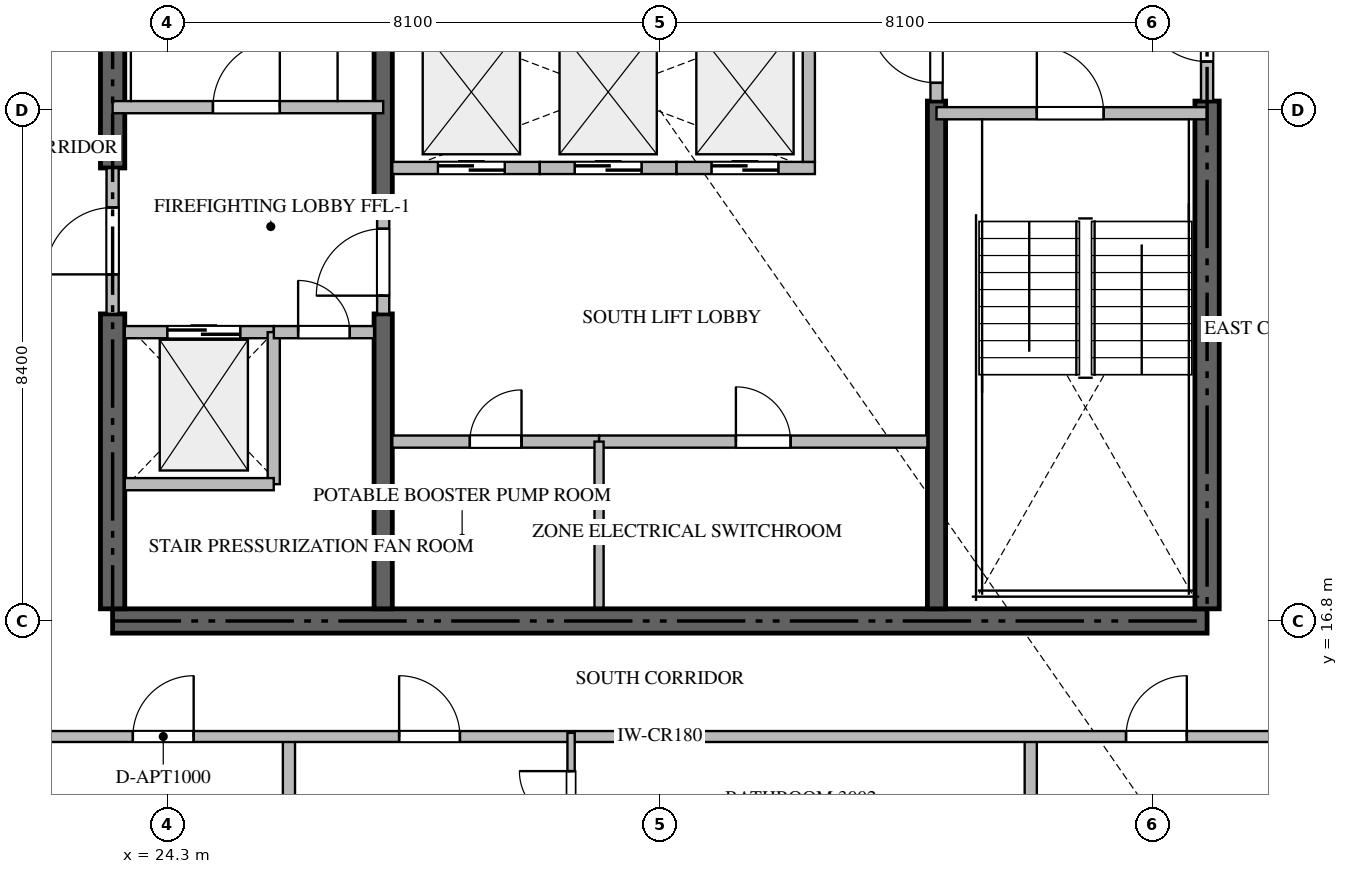
"""IFC4 building model, lengths in metres.
Left out: names, types, materials, properties, quantities, classifications, styles, units other than length and angle.
Written with IfcOpenShell. Run it as: python <this file> out.ifc"""

import sys

from ifc_helpers import new_model, si_unit, direction, frame, frame_2d, origin, place, context, subcontext, project, spatial, rectangle, extrude, source, transform, mapped, element, fill, save


model = new_model("IFC4")
c1 = context("Model", 3, precision=1e-05, world=origin(), true_north=direction((0.0, 1.0)))
c2 = subcontext(c1, "Body", "Model", "MODEL_VIEW")
j1 = project(units=[si_unit("LENGTHUNIT", "METRE"), si_unit("PLANEANGLEUNIT", "RADIAN")], contexts=[c1])
p1 = place(None, origin())
s1 = spatial("IfcSite", under=j1, at=p1, CompositionType="ELEMENT")
p2 = place(p1, origin())
s2 = spatial("IfcBuilding", under=s1, at=p2, CompositionType="ELEMENT")
p3 = place(p2, frame((0.0, 0.0, 123.9)))
s3 = spatial("IfcBuildingStorey", under=s2, at=p3, CompositionType="ELEMENT", Elevation=123.9)
p4 = place(p3, frame((23.4, 16.8, -0.26), z_axis=(0.0, 0.0, 1.0), x_axis=(1.0, 0.0, 0.0)))
e1 = element("IfcWall", 1, at=p4, inside=s3, PredefinedType="SHEAR", context=c2, shape_type="SweptSolid", body=[
    extrude(rectangle(XDim=18.0, YDim=0.4, at=frame_2d((9.0, 0.0))), origin(), (0.0, 0.0, 1.0), 3.748),
])
p5 = place(p3, frame((23.4, 17.0, -0.26), z_axis=(0.0, 0.0, 1.0), x_axis=(0.0, 1.0, 0.0)))
e2 = element("IfcWall", 2, at=p5, inside=s3, PredefinedType="SHEAR", context=c2, shape_type="SweptSolid", body=[
    extrude(rectangle(XDim=4.85, YDim=0.4, at=frame_2d((2.425, 0.0))), origin(), (0.0, 0.0, 1.0), 3.748),
])
p6 = place(p3, frame((23.4, 24.25, -0.26), z_axis=(0.0, 0.0, 1.0), x_axis=(0.0, 1.0, 0.0)))
e3 = element("IfcWall", 3, at=p6, inside=s3, PredefinedType="SHEAR", context=c2, shape_type="SweptSolid", body=[
    extrude(rectangle(XDim=9.15, YDim=0.4, at=frame_2d((4.575, 0.0))), origin(), (0.0, 0.0, 1.0), 3.748),
])
p7 = place(p3, frame((41.4, 17.0, -0.26), z_axis=(0.0, 0.0, 1.0), x_axis=(0.0, 1.0, 0.0)))
e4 = element("IfcWall", 4, at=p7, inside=s3, PredefinedType="SHEAR", context=c2, shape_type="SweptSolid", body=[
    extrude(rectangle(XDim=8.35, YDim=0.4, at=frame_2d((4.175, 0.0))), origin(), (0.0, 0.0, 1.0), 3.748),
])
p8 = place(p3, frame((27.85, 17.0, -0.26), z_axis=(0.0, 0.0, 1.0), x_axis=(0.0, 1.0, 0.0)))
e5 = element("IfcWall", 5, at=p8, inside=s3, PredefinedType="SHEAR", context=c2, shape_type="SweptSolid", body=[
    extrude(rectangle(XDim=4.85, YDim=0.3, at=frame_2d((2.425, 0.0))), origin(), (0.0, 0.0, 1.0), 3.748),
])
p9 = place(p3, frame((27.85, 23.55, -0.26), z_axis=(0.0, 0.0, 1.0), x_axis=(0.0, 1.0, 0.0)))
e6 = element("IfcWall", 6, at=p9, inside=s3, PredefinedType="SHEAR", context=c2, shape_type="SweptSolid", body=[
    extrude(rectangle(XDim=9.85, YDim=0.3, at=frame_2d((4.925, 0.0))), origin(), (0.0, 0.0, 1.0), 3.748),
])
p10 = place(p3, frame((36.95, 17.0, -0.26), z_axis=(0.0, 0.0, 1.0), x_axis=(0.0, 1.0, 0.0)))
e7 = element("IfcWall", 7, at=p10, inside=s3, PredefinedType="SHEAR", context=c2, shape_type="SweptSolid", body=[
    extrude(rectangle(XDim=8.35, YDim=0.3, at=frame_2d((4.175, 0.0))), origin(), (0.0, 0.0, 1.0), 3.748),
])
p11 = place(p3, frame((23.4, 25.25, 0.0), z_axis=(0.0, 0.0, 1.0), x_axis=(1.0, 0.0, 0.0)))
e8 = element("IfcWall", 8, at=p11, inside=s3, PredefinedType="STANDARD", context=c2, shape_type="SweptSolid", body=[
    extrude(rectangle(XDim=4.45, YDim=0.2, at=frame_2d((2.225, 0.0))), origin(), (0.0, 0.0, 1.0), 3.49),
])
p12 = place(p11, frame((1.65, 0.0, 0.0)))
e9 = element("IfcOpeningElement", 9, at=p12, cuts=e8, PredefinedType="OPENING", context=c2, shape_type="SweptSolid", body=[
    extrude(rectangle(XDim=1.1, YDim=2.15, at=frame_2d((0.55, 1.075))), frame((0.0, 0.11, 0.0), z_axis=(0.0, -1.0, 0.0), x_axis=(1.0, 0.0, 0.0)), (0.0, 0.0, 1.0), 0.22),
])
p13 = place(p3, frame((36.95, 25.15, 0.0), z_axis=(0.0, 0.0, 1.0), x_axis=(1.0, 0.0, 0.0)))
e10 = element("IfcWall", 10, at=p13, inside=s3, PredefinedType="STANDARD", context=c2, shape_type="SweptSolid", body=[
    extrude(rectangle(XDim=4.45, YDim=0.2, at=frame_2d((2.225, 0.0))), origin(), (0.0, 0.0, 1.0), 3.49),
])
p14 = place(p13, frame((1.65, 0.0, 0.0)))
e11 = element("IfcOpeningElement", 11, at=p14, cuts=e10, PredefinedType="OPENING", context=c2, shape_type="SweptSolid", body=[
    extrude(rectangle(XDim=1.1, YDim=2.15, at=frame_2d((0.55, 1.075))), frame((0.0, 0.11, 0.0), z_axis=(0.0, -1.0, 0.0), x_axis=(1.0, 0.0, 0.0)), (0.0, 0.0, 1.0), 0.22),
])
p15 = place(p3, frame((23.6, 21.55, 0.0), z_axis=(0.0, 0.0, 1.0), x_axis=(1.0, 0.0, 0.0)))
e12 = element("IfcWall", 12, at=p15, inside=s3, PredefinedType="STANDARD", context=c2, shape_type="SweptSolid", body=[
    extrude(rectangle(XDim=2.45, YDim=0.2, at=frame_2d((1.225, 0.0))), origin(), (0.0, 0.0, 1.0), 3.49),
])
p16 = place(p15, frame((0.7, 0.0, 0.0)))
e13 = element("IfcOpeningElement", 13, at=p16, cuts=e12, PredefinedType="OPENING", context=c2, shape_type="SweptSolid", body=[
    extrude(rectangle(XDim=1.2, YDim=2.2, at=frame_2d((0.6, 1.1))), frame((0.0, 0.11, 0.0), z_axis=(0.0, -1.0, 0.0), x_axis=(1.0, 0.0, 0.0)), (0.0, 0.0, 1.0), 0.22),
])
p17 = place(p3, frame((28.0, 24.25, 0.0), z_axis=(0.0, 0.0, 1.0), x_axis=(1.0, 0.0, 0.0)))
e14 = element("IfcWall", 14, at=p17, inside=s3, PredefinedType="STANDARD", context=c2, shape_type="SweptSolid", body=[
    extrude(rectangle(XDim=2.425, YDim=0.2, at=frame_2d((1.212, 0.0))), origin(), (0.0, 0.0, 1.0), 3.49),
])
p18 = place(p17, frame((0.75, 0.0, 0.0)))
e15 = element("IfcOpeningElement", 15, at=p18, cuts=e14, PredefinedType="OPENING", context=c2, shape_type="SweptSolid", body=[
    extrude(rectangle(XDim=1.1, YDim=2.2, at=frame_2d((0.55, 1.1))), frame((0.0, 0.11, 0.0), z_axis=(0.0, -1.0, 0.0), x_axis=(1.0, 0.0, 0.0)), (0.0, 0.0, 1.0), 0.22),
])
p19 = place(p3, frame((30.425, 24.25, 0.0), z_axis=(0.0, 0.0, 1.0), x_axis=(1.0, 0.0, 0.0)))
e16 = element("IfcWall", 16, at=p19, inside=s3, PredefinedType="STANDARD", context=c2, shape_type="SweptSolid", body=[
    extrude(rectangle(XDim=2.25, YDim=0.2, at=frame_2d((1.125, 0.0))), origin(), (0.0, 0.0, 1.0), 3.49),
])
p20 = place(p19, frame((0.575, 0.0, 0.0)))
e17 = element("IfcOpeningElement", 17, at=p20, cuts=e16, PredefinedType="OPENING", context=c2, shape_type="SweptSolid", body=[
    extrude(rectangle(XDim=1.1, YDim=2.2, at=frame_2d((0.55, 1.1))), frame((0.0, 0.11, 0.0), z_axis=(0.0, -1.0, 0.0), x_axis=(1.0, 0.0, 0.0)), (0.0, 0.0, 1.0), 0.22),
])
p21 = place(p3, frame((32.675, 24.25, 0.0), z_axis=(0.0, 0.0, 1.0), x_axis=(1.0, 0.0, 0.0)))
e18 = element("IfcWall", 18, at=p21, inside=s3, PredefinedType="STANDARD", context=c2, shape_type="SweptSolid", body=[
    extrude(rectangle(XDim=2.275, YDim=0.2, at=frame_2d((1.137, 0.0))), origin(), (0.0, 0.0, 1.0), 3.49),
])
p22 = place(p21, frame((0.575, 0.0, 0.0)))
e19 = element("IfcOpeningElement", 19, at=p22, cuts=e18, PredefinedType="OPENING", context=c2, shape_type="SweptSolid", body=[
    extrude(rectangle(XDim=1.1, YDim=2.2, at=frame_2d((0.55, 1.1))), frame((0.0, 0.11, 0.0), z_axis=(0.0, -1.0, 0.0), x_axis=(1.0, 0.0, 0.0)), (0.0, 0.0, 1.0), 0.22),
])
for number, where, z_axis, x_axis in (
    (20, (34.85, 24.35, 0.0), (0.0, 0.0, 1.0), (0.0, 1.0, 0.0)),
    (21, (26.05, 19.05, 0.0), (0.0, 0.0, 1.0), (0.0, 1.0, 0.0)),
):
    element("IfcWall", number, at=place(p3, frame(where, z_axis=z_axis, x_axis=x_axis)), inside=s3, PredefinedType="STANDARD", context=c2, shape_type="SweptSolid", body=[
        extrude(rectangle(XDim=2.5, YDim=0.2, at=frame_2d((1.25, 0.0))), origin(), (0.0, 0.0, 1.0), 3.49),
    ])
p23 = place(p3, frame((23.6, 19.05, 0.0), z_axis=(0.0, 0.0, 1.0), x_axis=(1.0, 0.0, 0.0)))
e22 = element("IfcWall", 22, at=p23, inside=s3, PredefinedType="STANDARD", context=c2, shape_type="SweptSolid", body=[
    extrude(rectangle(XDim=2.45, YDim=0.2, at=frame_2d((1.225, 0.0))), origin(), (0.0, 0.0, 1.0), 3.49),
])
p24 = place(p3, frame((26.052, 21.55, 0.0), z_axis=(0.0, 0.0, 1.0), x_axis=(1.0, 0.0, 0.0)))
e23 = element("IfcWall", 23, at=p24, inside=s3, PredefinedType="STANDARD", context=c2, shape_type="SweptSolid", body=[
    extrude(rectangle(XDim=1.648, YDim=0.2, at=frame_2d((0.824, 0.0))), origin(), (0.0, 0.0, 1.0), 3.49),
])
p25 = place(p24, frame((0.399, 0.0, 0.0)))
e24 = element("IfcOpeningElement", 24, at=p25, cuts=e23, PredefinedType="OPENING", context=c2, shape_type="SweptSolid", body=[
    extrude(rectangle(XDim=0.85, YDim=2.1, at=frame_2d((0.425, 1.05))), frame((0.0, 0.11, 0.0), z_axis=(0.0, -1.0, 0.0), x_axis=(1.0, 0.0, 0.0)), (0.0, 0.0, 1.0), 0.22),
])
p26 = place(p3, frame((23.4, 21.852, 0.0), z_axis=(0.0, 0.0, 1.0), x_axis=(0.0, 1.0, 0.0)))
e25 = element("IfcWall", 25, at=p26, inside=s3, PredefinedType="STANDARD", context=c2, shape_type="SweptSolid", body=[
    extrude(rectangle(XDim=2.396, YDim=0.2, at=frame_2d((1.198, 0.0))), origin(), (0.0, 0.0, 1.0), 3.49),
])
p27 = place(p26, frame((0.648, 0.0, 0.0)))
e26 = element("IfcOpeningElement", 26, at=p27, cuts=e25, PredefinedType="OPENING", context=c2, shape_type="SweptSolid", body=[
    extrude(rectangle(XDim=1.1, YDim=2.15, at=frame_2d((0.55, 1.075))), frame((0.0, 0.11, 0.0), z_axis=(0.0, -1.0, 0.0), x_axis=(1.0, 0.0, 0.0)), (0.0, 0.0, 1.0), 0.22),
])
p28 = place(p3, frame((41.4, 25.352, 0.0), z_axis=(0.0, 0.0, 1.0), x_axis=(0.0, 1.0, 0.0)))
e27 = element("IfcWall", 27, at=p28, inside=s3, PredefinedType="STANDARD", context=c2, shape_type="SweptSolid", body=[
    extrude(rectangle(XDim=2.396, YDim=0.2, at=frame_2d((1.198, 0.0))), origin(), (0.0, 0.0, 1.0), 3.49),
])
p29 = place(p28, frame((0.648, 0.0, 0.0)))
e28 = element("IfcOpeningElement", 28, at=p29, cuts=e27, PredefinedType="OPENING", context=c2, shape_type="SweptSolid", body=[
    extrude(rectangle(XDim=1.1, YDim=2.15, at=frame_2d((0.55, 1.075))), frame((0.0, 0.11, 0.0), z_axis=(0.0, -1.0, 0.0), x_axis=(1.0, 0.0, 0.0)), (0.0, 0.0, 1.0), 0.22),
])
p30 = place(p3, frame((27.85, 21.852, 0.0), z_axis=(0.0, 0.0, 1.0), x_axis=(0.0, 1.0, 0.0)))
e29 = element("IfcWall", 29, at=p30, inside=s3, PredefinedType="STANDARD", context=c2, shape_type="SweptSolid", body=[
    extrude(rectangle(XDim=1.696, YDim=0.2, at=frame_2d((0.848, 0.0))), origin(), (0.0, 0.0, 1.0), 3.49),
])
p31 = place(p30, frame((0.298, 0.0, 0.0)))
e30 = element("IfcOpeningElement", 30, at=p31, cuts=e29, PredefinedType="OPENING", context=c2, shape_type="SweptSolid", body=[
    extrude(rectangle(XDim=1.1, YDim=2.15, at=frame_2d((0.55, 1.075))), frame((0.0, 0.11, 0.0), z_axis=(0.0, -1.0, 0.0), x_axis=(1.0, 0.0, 0.0)), (0.0, 0.0, 1.0), 0.22),
])
p32 = place(p3, frame((36.95, 25.352, 0.0), z_axis=(0.0, 0.0, 1.0), x_axis=(0.0, 1.0, 0.0)))
e31 = element("IfcWall", 31, at=p32, inside=s3, PredefinedType="STANDARD", context=c2, shape_type="SweptSolid", body=[
    extrude(rectangle(XDim=1.696, YDim=0.2, at=frame_2d((0.848, 0.0))), origin(), (0.0, 0.0, 1.0), 3.49),
])
p33 = place(p32, frame((0.298, 0.0, 0.0)))
e32 = element("IfcOpeningElement", 32, at=p33, cuts=e31, PredefinedType="OPENING", context=c2, shape_type="SweptSolid", body=[
    extrude(rectangle(XDim=1.1, YDim=2.15, at=frame_2d((0.55, 1.075))), frame((0.0, 0.11, 0.0), z_axis=(0.0, -1.0, 0.0), x_axis=(1.0, 0.0, 0.0)), (0.0, 0.0, 1.0), 0.22),
])
p34 = place(p3, frame((28.0, 19.75, 0.0), z_axis=(0.0, 0.0, 1.0), x_axis=(1.0, 0.0, 0.0)))
e33 = element("IfcWall", 33, at=p34, inside=s3, PredefinedType="STANDARD", context=c2, shape_type="SweptSolid", body=[
    extrude(rectangle(XDim=3.4, YDim=0.2, at=frame_2d((1.7, 0.0))), origin(), (0.0, 0.0, 1.0), 3.49),
])
p35 = place(p34, frame((1.275, 0.0, 0.0)))
e34 = element("IfcOpeningElement", 34, at=p35, cuts=e33, PredefinedType="OPENING", context=c2, shape_type="SweptSolid", body=[
    extrude(rectangle(XDim=0.85, YDim=2.1, at=frame_2d((0.425, 1.05))), frame((0.0, 0.11, 0.0), z_axis=(0.0, -1.0, 0.0), x_axis=(1.0, 0.0, 0.0)), (0.0, 0.0, 1.0), 0.22),
])
p36 = place(p3, frame((31.402, 19.75, 0.0), z_axis=(0.0, 0.0, 1.0), x_axis=(1.0, 0.0, 0.0)))
e35 = element("IfcWall", 35, at=p36, inside=s3, PredefinedType="STANDARD", context=c2, shape_type="SweptSolid", body=[
    extrude(rectangle(XDim=5.398, YDim=0.2, at=frame_2d((2.699, 0.0))), origin(), (0.0, 0.0, 1.0), 3.49),
])
p37 = place(p36, frame((2.249, 0.0, 0.0)))
e36 = element("IfcOpeningElement", 36, at=p37, cuts=e35, PredefinedType="OPENING", context=c2, shape_type="SweptSolid", body=[
    extrude(rectangle(XDim=0.9, YDim=2.1, at=frame_2d((0.45, 1.05))), frame((0.0, 0.11, 0.0), z_axis=(0.0, -1.0, 0.0), x_axis=(1.0, 0.0, 0.0)), (0.0, 0.0, 1.0), 0.22),
])
p38 = place(p3, frame((31.4, 17.02, 0.0), z_axis=(0.0, 0.0, 1.0), x_axis=(0.0, 1.0, 0.0)))
e37 = element("IfcWall", 37, at=p38, inside=s3, PredefinedType="PARTITIONING", context=c2, shape_type="SweptSolid", body=[
    extrude(rectangle(XDim=2.73, YDim=0.15, at=frame_2d((1.365, 0.0))), origin(), (0.0, 0.0, 1.0), 3.49),
])
for number, where, z_axis, x_axis in (
    (38, (26.3, 1.482, 0.0), (0.0, 0.0, 1.0), (0.0, 1.0, 0.0)),
    (39, (38.5, 1.482, 0.0), (0.0, 0.0, 1.0), (0.0, 1.0, 0.0)),
):
    element("IfcWall", number, at=place(p3, frame(where, z_axis=z_axis, x_axis=x_axis)), inside=s3, PredefinedType="PARTITIONING", context=c2, shape_type="SweptSolid", body=[
        extrude(rectangle(XDim=13.418, YDim=0.2, at=frame_2d((6.709, 0.0))), origin(), (0.0, 0.0, 1.0), 3.49),
    ])
p39 = place(p3, frame((20.952, 14.9, 0.0), z_axis=(0.0, 0.0, 1.0), x_axis=(1.0, 0.0, 0.0)))
e40 = element("IfcWall", 40, at=p39, inside=s3, PredefinedType="PARTITIONING", context=c2, shape_type="SweptSolid", body=[
    extrude(rectangle(XDim=22.896, YDim=0.18, at=frame_2d((11.448, 0.0))), origin(), (0.0, 0.0, 1.0), 3.49),
])
p40 = place(p39, frame((2.781, 0.0, 0.0)))
e41 = element("IfcOpeningElement", 41, at=p40, cuts=e40, PredefinedType="OPENING", context=c2, shape_type="SweptSolid", body=[
    extrude(rectangle(XDim=1.0, YDim=2.15, at=frame_2d((0.5, 1.075))), frame((0.0, 0.1, 0.0), z_axis=(0.0, -1.0, 0.0), x_axis=(1.0, 0.0, 0.0)), (0.0, 0.0, 1.0), 0.2),
])
p41 = place(p39, frame((7.16, 0.0, 0.0)))
e42 = element("IfcOpeningElement", 42, at=p41, cuts=e40, PredefinedType="OPENING", context=c2, shape_type="SweptSolid", body=[
    extrude(rectangle(XDim=1.0, YDim=2.15, at=frame_2d((0.5, 1.075))), frame((0.0, 0.1, 0.0), z_axis=(0.0, -1.0, 0.0), x_axis=(1.0, 0.0, 0.0)), (0.0, 0.0, 1.0), 0.2),
])
p42 = place(p39, frame((19.115, 0.0, 0.0)))
e43 = element("IfcOpeningElement", 43, at=p42, cuts=e40, PredefinedType="OPENING", context=c2, shape_type="SweptSolid", body=[
    extrude(rectangle(XDim=1.0, YDim=2.15, at=frame_2d((0.5, 1.075))), frame((0.0, 0.1, 0.0), z_axis=(0.0, -1.0, 0.0), x_axis=(1.0, 0.0, 0.0)), (0.0, 0.0, 1.0), 0.2),
])
p43 = place(p3, frame((30.94, 12.852, 0.0), z_axis=(0.0, 0.0, 1.0), x_axis=(0.0, 1.0, 0.0)))
e44 = element("IfcWall", 44, at=p43, inside=s3, PredefinedType="PARTITIONING", context=c2, shape_type="SweptSolid", body=[
    extrude(rectangle(XDim=2.108, YDim=0.12, at=frame_2d((1.054, 0.0))), origin(), (0.0, 0.0, 1.0), 3.49),
])
p44 = place(p43, frame((0.629, 0.0, 0.0)))
e45 = element("IfcOpeningElement", 45, at=p44, cuts=e44, PredefinedType="OPENING", context=c2, shape_type="SweptSolid", body=[
    extrude(rectangle(XDim=0.85, YDim=2.1, at=frame_2d((0.425, 1.05))), frame((0.0, 0.07, 0.0), z_axis=(0.0, -1.0, 0.0), x_axis=(1.0, 0.0, 0.0)), (0.0, 0.0, 1.0), 0.14),
])
m1 = source(origin(), c2, "Body", "SweptSolid", [
    extrude(rectangle(XDim=1.1, YDim=2.15, at=frame_2d((0.55, 1.075))), frame((0.0, 0.025, 0.0), z_axis=(0.0, -1.0, 0.0), x_axis=(1.0, 0.0, 0.0)), (0.0, 0.0, 1.0), 0.05),
])
p45 = place(p12, origin())
e46 = element("IfcDoor", 46, at=p45, inside=s3, OperationType="SINGLE_SWING_RIGHT", PredefinedType="DOOR", context=c2, shape_type="MappedRepresentation", body=[
    mapped(m1, transform((0.0, 0.0, 0.0), scale=1.0)),
])
fill(e9, e46)
p46 = place(p14, origin())
e47 = element("IfcDoor", 47, at=p46, inside=s3, OperationType="SINGLE_SWING_LEFT", PredefinedType="DOOR", context=c2, shape_type="MappedRepresentation", body=[
    mapped(m1, transform((0.0, 0.0, 0.0), scale=1.0)),
])
fill(e11, e47)
m2 = source(origin(), c2, "Body", "SweptSolid", [
    extrude(rectangle(XDim=1.2, YDim=2.2, at=frame_2d((0.6, 1.1))), frame((0.0, 0.025, 0.0), z_axis=(0.0, -1.0, 0.0), x_axis=(1.0, 0.0, 0.0)), (0.0, 0.0, 1.0), 0.05),
])
p47 = place(p16, origin())
e48 = element("IfcDoor", 48, at=p47, inside=s3, OperationType="DOUBLE_DOOR_SLIDING", PredefinedType="DOOR", context=c2, shape_type="MappedRepresentation", body=[
    mapped(m2, transform((0.0, 0.0, 0.0), scale=1.0)),
])
fill(e13, e48)
m3 = source(origin(), c2, "Body", "SweptSolid", [
    extrude(rectangle(XDim=1.1, YDim=2.2, at=frame_2d((0.55, 1.1))), frame((0.0, 0.025, 0.0), z_axis=(0.0, -1.0, 0.0), x_axis=(1.0, 0.0, 0.0)), (0.0, 0.0, 1.0), 0.05),
])
p48 = place(p18, origin())
e49 = element("IfcDoor", 49, at=p48, inside=s3, OperationType="DOUBLE_DOOR_SLIDING", PredefinedType="DOOR", context=c2, shape_type="MappedRepresentation", body=[
    mapped(m3, transform((0.0, 0.0, 0.0), scale=1.0)),
])
fill(e15, e49)
p49 = place(p20, origin())
e50 = element("IfcDoor", 50, at=p49, inside=s3, OperationType="DOUBLE_DOOR_SLIDING", PredefinedType="DOOR", context=c2, shape_type="MappedRepresentation", body=[
    mapped(m3, transform((0.0, 0.0, 0.0), scale=1.0)),
])
fill(e17, e50)
p50 = place(p22, origin())
e51 = element("IfcDoor", 51, at=p50, inside=s3, OperationType="DOUBLE_DOOR_SLIDING", PredefinedType="DOOR", context=c2, shape_type="MappedRepresentation", body=[
    mapped(m3, transform((0.0, 0.0, 0.0), scale=1.0)),
])
fill(e19, e51)
m4 = source(origin(), c2, "Body", "SweptSolid", [
    extrude(rectangle(XDim=0.85, YDim=2.1, at=frame_2d((0.425, 1.05))), frame((0.0, 0.025, 0.0), z_axis=(0.0, -1.0, 0.0), x_axis=(1.0, 0.0, 0.0)), (0.0, 0.0, 1.0), 0.05),
])
p51 = place(p25, origin())
e52 = element("IfcDoor", 52, at=p51, inside=s3, OperationType="SINGLE_SWING_LEFT", PredefinedType="DOOR", context=c2, shape_type="MappedRepresentation", body=[
    mapped(m4, transform((0.0, 0.0, 0.0), scale=1.0)),
])
fill(e24, e52)
p52 = place(p27, origin())
e53 = element("IfcDoor", 53, at=p52, inside=s3, OperationType="SINGLE_SWING_LEFT", PredefinedType="DOOR", context=c2, shape_type="MappedRepresentation", body=[
    mapped(m1, transform((0.0, 0.0, 0.0), scale=1.0)),
])
fill(e26, e53)
p53 = place(p29, origin())
e54 = element("IfcDoor", 54, at=p53, inside=s3, OperationType="SINGLE_SWING_RIGHT", PredefinedType="DOOR", context=c2, shape_type="MappedRepresentation", body=[
    mapped(m1, transform((0.0, 0.0, 0.0), scale=1.0)),
])
fill(e28, e54)
p54 = place(p31, origin())
e55 = element("IfcDoor", 55, at=p54, inside=s3, OperationType="SINGLE_SWING_LEFT", PredefinedType="DOOR", context=c2, shape_type="MappedRepresentation", body=[
    mapped(m1, transform((0.0, 0.0, 0.0), scale=1.0)),
])
fill(e30, e55)
p55 = place(p33, origin())
e56 = element("IfcDoor", 56, at=p55, inside=s3, OperationType="SINGLE_SWING_RIGHT", PredefinedType="DOOR", context=c2, shape_type="MappedRepresentation", body=[
    mapped(m1, transform((0.0, 0.0, 0.0), scale=1.0)),
])
fill(e32, e56)
p56 = place(p35, origin())
e57 = element("IfcDoor", 57, at=p56, inside=s3, OperationType="SINGLE_SWING_RIGHT", PredefinedType="DOOR", context=c2, shape_type="MappedRepresentation", body=[
    mapped(m4, transform((0.0, 0.0, 0.0), scale=1.0)),
])
fill(e34, e57)
m5 = source(origin(), c2, "Body", "SweptSolid", [
    extrude(rectangle(XDim=0.9, YDim=2.1, at=frame_2d((0.45, 1.05))), frame((0.0, 0.025, 0.0), z_axis=(0.0, -1.0, 0.0), x_axis=(1.0, 0.0, 0.0)), (0.0, 0.0, 1.0), 0.05),
])
p57 = place(p37, origin())
e58 = element("IfcDoor", 58, at=p57, inside=s3, OperationType="SINGLE_SWING_LEFT", PredefinedType="DOOR", context=c2, shape_type="MappedRepresentation", body=[
    mapped(m5, transform((0.0, 0.0, 0.0), scale=1.0)),
])
fill(e36, e58)
m6 = source(origin(), c2, "Body", "SweptSolid", [
    extrude(rectangle(XDim=1.0, YDim=2.15, at=frame_2d((0.5, 1.075))), frame((0.0, 0.025, 0.0), z_axis=(0.0, -1.0, 0.0), x_axis=(1.0, 0.0, 0.0)), (0.0, 0.0, 1.0), 0.05),
])
p58 = place(p40, origin())
e59 = element("IfcDoor", 59, at=p58, inside=s3, OperationType="SINGLE_SWING_RIGHT", PredefinedType="DOOR", context=c2, shape_type="MappedRepresentation", body=[
    mapped(m6, transform((0.0, 0.0, 0.0), scale=1.0)),
])
fill(e41, e59)
p59 = place(p41, origin())
e60 = element("IfcDoor", 60, at=p59, inside=s3, OperationType="SINGLE_SWING_LEFT", PredefinedType="DOOR", context=c2, shape_type="MappedRepresentation", body=[
    mapped(m6, transform((0.0, 0.0, 0.0), scale=1.0)),
])
fill(e42, e60)
p60 = place(p42, origin())
e61 = element("IfcDoor", 61, at=p60, inside=s3, OperationType="SINGLE_SWING_RIGHT", PredefinedType="DOOR", context=c2, shape_type="MappedRepresentation", body=[
    mapped(m6, transform((0.0, 0.0, 0.0), scale=1.0)),
])
fill(e43, e61)
p61 = place(p44, origin())
e62 = element("IfcDoor", 62, at=p61, inside=s3, OperationType="SINGLE_SWING_RIGHT", PredefinedType="DOOR", context=c2, shape_type="MappedRepresentation", body=[
    mapped(m4, transform((0.0, 0.0, 0.0), scale=1.0)),
])
fill(e45, e62)
save(model, sys.argv[1])
